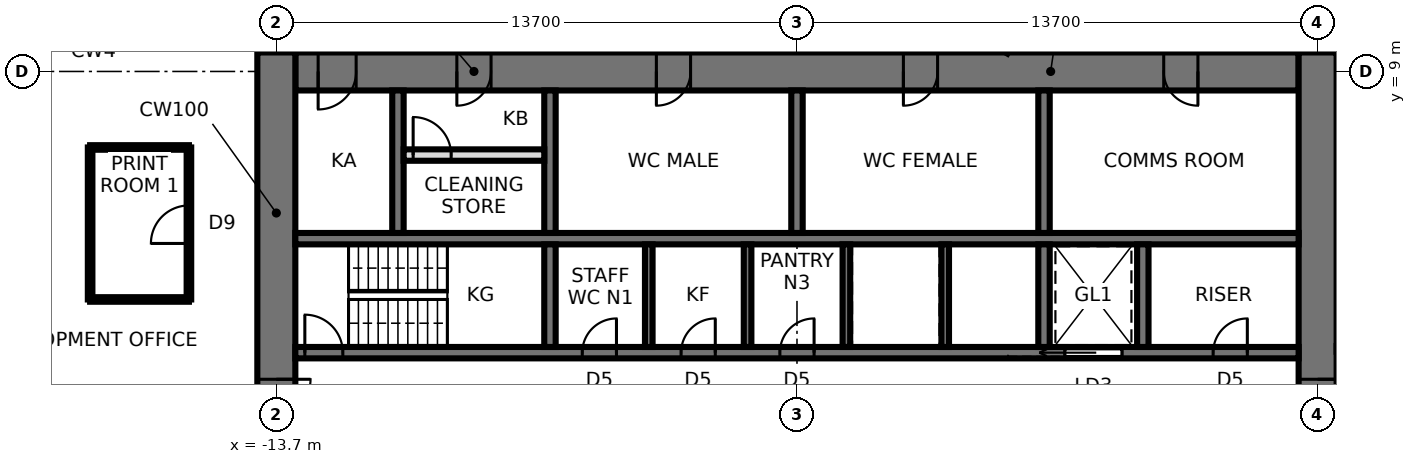
"""IFC4 building model, lengths in metres.
Left out: names, types, materials, properties, quantities, classifications, styles, units other than length and angle.
Written with IfcOpenShell. Run it as: python <this file> out.ifc"""

import sys

from ifc_helpers import new_model, si_unit, direction, frame, frame_2d, origin, place, context, subcontext, project, spatial, rectangle, extrude, element, fill, save


model = new_model("IFC4")
c1 = context("Model", 3, precision=1e-05, world=origin(), true_north=direction((0.0, 1.0)))
c2 = subcontext(c1, "Body", "Model", "MODEL_VIEW")
j1 = project(units=[si_unit("LENGTHUNIT", "METRE"), si_unit("PLANEANGLEUNIT", "RADIAN")], contexts=[c1])
p1 = place(None, origin())
s1 = spatial("IfcSite", under=j1, at=p1, CompositionType="ELEMENT")
p2 = place(p1, origin())
s2 = spatial("IfcBuilding", under=s1, at=p2, CompositionType="ELEMENT")
p3 = place(p2, frame((0.0, 0.0, 135.3)))
s3 = spatial("IfcBuildingStorey", under=s2, at=p3, CompositionType="ELEMENT", Elevation=135.3)
p4 = place(p3, frame((13.2, 9.0, 0.0), z_axis=(0.0, 0.0, 1.0), x_axis=(-1.0, 0.0, 0.0)))
e1 = element("IfcWall", 1, at=p4, inside=s3, PredefinedType="SHEAR", context=c2, shape_type="SweptSolid", body=[
    extrude(rectangle(XDim=26.4, YDim=1.0, at=frame_2d((13.2, 0.0))), origin(), (0.0, 0.0, 1.0), 3.9),
])
p5 = place(p4, frame((2.65, 0.0, 0.0)))
e2 = element("IfcOpeningElement", 2, at=p5, cuts=e1, PredefinedType="OPENING", context=c2, shape_type="SweptSolid", body=[
    extrude(rectangle(XDim=0.9, YDim=2.1, at=frame_2d((0.45, 1.05))), frame((0.0, 0.51, 0.0), z_axis=(0.0, -1.0, 0.0), x_axis=(1.0, 0.0, 0.0)), (0.0, 0.0, 1.0), 1.02),
])
p6 = place(p4, frame((9.5, 0.0, 0.0)))
e3 = element("IfcOpeningElement", 3, at=p6, cuts=e1, PredefinedType="OPENING", context=c2, shape_type="SweptSolid", body=[
    extrude(rectangle(XDim=0.9, YDim=2.1, at=frame_2d((0.45, 1.05))), frame((0.0, 0.51, 0.0), z_axis=(0.0, -1.0, 0.0), x_axis=(1.0, 0.0, 0.0)), (0.0, 0.0, 1.0), 1.02),
])
p7 = place(p4, frame((16.0, 0.0, 0.0)))
e4 = element("IfcOpeningElement", 4, at=p7, cuts=e1, PredefinedType="OPENING", context=c2, shape_type="SweptSolid", body=[
    extrude(rectangle(XDim=0.9, YDim=2.1, at=frame_2d((0.45, 1.05))), frame((0.0, 0.51, 0.0), z_axis=(0.0, -1.0, 0.0), x_axis=(1.0, 0.0, 0.0)), (0.0, 0.0, 1.0), 1.02),
])
p8 = place(p4, frame((21.25, 0.0, 0.0)))
e5 = element("IfcOpeningElement", 5, at=p8, cuts=e1, PredefinedType="OPENING", context=c2, shape_type="SweptSolid", body=[
    extrude(rectangle(XDim=0.9, YDim=2.1, at=frame_2d((0.45, 1.05))), frame((0.0, 0.51, 0.0), z_axis=(0.0, -1.0, 0.0), x_axis=(1.0, 0.0, 0.0)), (0.0, 0.0, 1.0), 1.02),
])
p9 = place(p4, frame((24.8, 0.0, 0.0)))
e6 = element("IfcOpeningElement", 6, at=p9, cuts=e1, PredefinedType="OPENING", context=c2, shape_type="SweptSolid", body=[
    extrude(rectangle(XDim=1.0, YDim=2.1, at=frame_2d((0.5, 1.05))), frame((0.0, 0.51, 0.0), z_axis=(0.0, -1.0, 0.0), x_axis=(1.0, 0.0, 0.0)), (0.0, 0.0, 1.0), 1.02),
])
p10 = place(p3, frame((13.7, -9.5, 0.0), z_axis=(0.0, 0.0, 1.0), x_axis=(0.0, 1.0, 0.0)))
e7 = element("IfcWall", 7, at=p10, inside=s3, PredefinedType="SHEAR", context=c2, shape_type="SweptSolid", body=[
    extrude(rectangle(XDim=19.0, YDim=1.0, at=frame_2d((9.5, 0.0))), origin(), (0.0, 0.0, 1.0), 3.9),
])
p11 = place(p10, frame((8.6, 0.0, 0.0)))
e8 = element("IfcOpeningElement", 8, at=p11, cuts=e7, PredefinedType="OPENING", context=c2, shape_type="SweptSolid", body=[
    extrude(rectangle(XDim=1.8, YDim=2.4, at=frame_2d((0.9, 1.2))), frame((0.0, 0.51, 0.0), z_axis=(0.0, -1.0, 0.0), x_axis=(1.0, 0.0, 0.0)), (0.0, 0.0, 1.0), 1.02),
])
p12 = place(p3, frame((-13.7, 9.5, 0.0), z_axis=(0.0, 0.0, 1.0), x_axis=(0.0, -1.0, 0.0)))
e9 = element("IfcWall", 9, at=p12, inside=s3, PredefinedType="SHEAR", context=c2, shape_type="SweptSolid", body=[
    extrude(rectangle(XDim=19.0, YDim=1.0, at=frame_2d((9.5, 0.0))), origin(), (0.0, 0.0, 1.0), 3.9),
])
p13 = place(p12, frame((8.6, 0.0, 0.0)))
e10 = element("IfcOpeningElement", 10, at=p13, cuts=e9, PredefinedType="OPENING", context=c2, shape_type="SweptSolid", body=[
    extrude(rectangle(XDim=1.8, YDim=2.4, at=frame_2d((0.9, 1.2))), frame((0.0, 0.51, 0.0), z_axis=(0.0, -1.0, 0.0), x_axis=(1.0, 0.0, 0.0)), (0.0, 0.0, 1.0), 1.02),
])
p14 = place(p3, frame((-13.2, 1.6, 0.0), z_axis=(0.0, 0.0, 1.0), x_axis=(1.0, 0.0, 0.0)))
e11 = element("IfcWall", 11, at=p14, inside=s3, PredefinedType="SHEAR", context=c2, shape_type="SweptSolid", body=[
    extrude(rectangle(XDim=26.4, YDim=0.3, at=frame_2d((13.2, 0.0))), origin(), (0.0, 0.0, 1.0), 3.9),
])
p15 = place(p14, frame((0.25, 0.0, 0.0)))
e12 = element("IfcOpeningElement", 12, at=p15, cuts=e11, PredefinedType="OPENING", context=c2, shape_type="SweptSolid", body=[
    extrude(rectangle(XDim=1.0, YDim=2.1, at=frame_2d((0.5, 1.05))), frame((0.0, 0.16, 0.0), z_axis=(0.0, -1.0, 0.0), x_axis=(1.0, 0.0, 0.0)), (0.0, 0.0, 1.0), 0.32),
])
p16 = place(p14, frame((20.25, 0.0, 0.0)))
e13 = element("IfcOpeningElement", 13, at=p16, cuts=e11, PredefinedType="OPENING", context=c2, shape_type="SweptSolid", body=[
    extrude(rectangle(XDim=1.5, YDim=2.4, at=frame_2d((0.75, 1.2))), frame((0.0, 0.16, 0.0), z_axis=(0.0, -1.0, 0.0), x_axis=(1.0, 0.0, 0.0)), (0.0, 0.0, 1.0), 0.32),
])
p17 = place(p14, frame((7.55, 0.0, 0.0)))
e14 = element("IfcOpeningElement", 14, at=p17, cuts=e11, PredefinedType="OPENING", context=c2, shape_type="SweptSolid", body=[
    extrude(rectangle(XDim=0.9, YDim=2.1, at=frame_2d((0.45, 1.05))), frame((0.0, 0.16, 0.0), z_axis=(0.0, -1.0, 0.0), x_axis=(1.0, 0.0, 0.0)), (0.0, 0.0, 1.0), 0.32),
])
p18 = place(p14, frame((10.15, 0.0, 0.0)))
e15 = element("IfcOpeningElement", 15, at=p18, cuts=e11, PredefinedType="OPENING", context=c2, shape_type="SweptSolid", body=[
    extrude(rectangle(XDim=0.9, YDim=2.1, at=frame_2d((0.45, 1.05))), frame((0.0, 0.16, 0.0), z_axis=(0.0, -1.0, 0.0), x_axis=(1.0, 0.0, 0.0)), (0.0, 0.0, 1.0), 0.32),
])
p19 = place(p14, frame((12.75, 0.0, 0.0)))
e16 = element("IfcOpeningElement", 16, at=p19, cuts=e11, PredefinedType="OPENING", context=c2, shape_type="SweptSolid", body=[
    extrude(rectangle(XDim=0.9, YDim=2.1, at=frame_2d((0.45, 1.05))), frame((0.0, 0.16, 0.0), z_axis=(0.0, -1.0, 0.0), x_axis=(1.0, 0.0, 0.0)), (0.0, 0.0, 1.0), 0.32),
])
p20 = place(p14, frame((24.15, 0.0, 0.0)))
e17 = element("IfcOpeningElement", 17, at=p20, cuts=e11, PredefinedType="OPENING", context=c2, shape_type="SweptSolid", body=[
    extrude(rectangle(XDim=0.9, YDim=2.1, at=frame_2d((0.45, 1.05))), frame((0.0, 0.16, 0.0), z_axis=(0.0, -1.0, 0.0), x_axis=(1.0, 0.0, 0.0)), (0.0, 0.0, 1.0), 0.32),
])
p21 = place(p3, frame((-13.2, 4.6, 0.0), z_axis=(0.0, 0.0, 1.0), x_axis=(1.0, 0.0, 0.0)))
e18 = element("IfcWall", 18, at=p21, inside=s3, PredefinedType="SHEAR", context=c2, shape_type="SweptSolid", body=[
    extrude(rectangle(XDim=26.4, YDim=0.3, at=frame_2d((13.2, 0.0))), origin(), (0.0, 0.0, 1.0), 3.9),
])
p22 = place(p3, frame((-6.5, 1.75, 0.0), z_axis=(0.0, 0.0, 1.0), x_axis=(0.0, 1.0, 0.0)))
e19 = element("IfcWall", 19, at=p22, inside=s3, PredefinedType="SHEAR", context=c2, shape_type="SweptSolid", body=[
    extrude(rectangle(XDim=2.7, YDim=0.3, at=frame_2d((1.35, 0.0))), origin(), (0.0, 0.0, 1.0), 3.9),
])
p23 = place(p3, frame((-6.5, 4.75, 0.0), z_axis=(0.0, 0.0, 1.0), x_axis=(0.0, 1.0, 0.0)))
e20 = element("IfcWall", 20, at=p23, inside=s3, PredefinedType="SHEAR", context=c2, shape_type="SweptSolid", body=[
    extrude(rectangle(XDim=3.75, YDim=0.3, at=frame_2d((1.875, 0.0))), origin(), (0.0, 0.0, 1.0), 3.9),
])
p24 = place(p3, frame((6.5, 1.75, 0.0), z_axis=(0.0, 0.0, 1.0), x_axis=(0.0, 1.0, 0.0)))
e21 = element("IfcWall", 21, at=p24, inside=s3, PredefinedType="SHEAR", context=c2, shape_type="SweptSolid", body=[
    extrude(rectangle(XDim=2.7, YDim=0.3, at=frame_2d((1.35, 0.0))), origin(), (0.0, 0.0, 1.0), 3.9),
])
p25 = place(p3, frame((6.5, 4.75, 0.0), z_axis=(0.0, 0.0, 1.0), x_axis=(0.0, 1.0, 0.0)))
e22 = element("IfcWall", 22, at=p25, inside=s3, PredefinedType="SHEAR", context=c2, shape_type="SweptSolid", body=[
    extrude(rectangle(XDim=3.75, YDim=0.3, at=frame_2d((1.875, 0.0))), origin(), (0.0, 0.0, 1.0), 3.9),
])
for number, where, z_axis, x_axis in (
    (23, (-3.9, 1.75, 0.0), (0.0, 0.0, 1.0), (0.0, 1.0, 0.0)),
    (24, (-1.3, 1.75, 0.0), (0.0, 0.0, 1.0), (0.0, 1.0, 0.0)),
    (25, (1.3, 1.75, 0.0), (0.0, 0.0, 1.0), (0.0, 1.0, 0.0)),
    (26, (3.9, 1.75, 0.0), (0.0, 0.0, 1.0), (0.0, 1.0, 0.0)),
):
    element("IfcWall", number, at=place(p3, frame(where, z_axis=z_axis, x_axis=x_axis)), inside=s3, PredefinedType="SHEAR", context=c2, shape_type="SweptSolid", body=[
        extrude(rectangle(XDim=2.7, YDim=0.2, at=frame_2d((1.35, 0.0))), origin(), (0.0, 0.0, 1.0), 3.9),
    ])
for number, where, z_axis, x_axis in (
    (27, (0.0, 4.75, 0.0), (0.0, 0.0, 1.0), (0.0, 1.0, 0.0)),
    (28, (-10.5, 4.75, 0.0), (0.0, 0.0, 1.0), (0.0, 1.0, 0.0)),
):
    element("IfcWall", number, at=place(p3, frame(where, z_axis=z_axis, x_axis=x_axis)), inside=s3, PredefinedType="SHEAR", context=c2, shape_type="SweptSolid", body=[
        extrude(rectangle(XDim=3.75, YDim=0.3, at=frame_2d((1.875, 0.0))), origin(), (0.0, 0.0, 1.0), 3.9),
    ])
p26 = place(p3, frame((9.1, 1.75, 0.0), z_axis=(0.0, 0.0, 1.0), x_axis=(0.0, 1.0, 0.0)))
e29 = element("IfcWall", 29, at=p26, inside=s3, PredefinedType="SHEAR", context=c2, shape_type="SweptSolid", body=[
    extrude(rectangle(XDim=2.7, YDim=0.3, at=frame_2d((1.35, 0.0))), origin(), (0.0, 0.0, 1.0), 3.9),
])
p27 = place(p3, frame((-10.35, 6.8, 0.0), z_axis=(0.0, 0.0, 1.0), x_axis=(1.0, 0.0, 0.0)))
e30 = element("IfcWall", 30, at=p27, inside=s3, PredefinedType="PARTITIONING", context=c2, shape_type="SweptSolid", body=[
    extrude(rectangle(XDim=3.7, YDim=0.3, at=frame_2d((1.85, 0.0))), origin(), (0.0, 0.0, 1.0), 3.74),
])
p28 = place(p27, frame((0.25, 0.0, 0.0)))
e31 = element("IfcOpeningElement", 31, at=p28, cuts=e30, PredefinedType="OPENING", context=c2, shape_type="SweptSolid", body=[
    extrude(rectangle(XDim=1.0, YDim=2.4, at=frame_2d((0.5, 1.2))), frame((0.0, 0.16, 0.0), z_axis=(0.0, -1.0, 0.0), x_axis=(1.0, 0.0, 0.0)), (0.0, 0.0, 1.0), 0.32),
])
p29 = place(p3, frame((6.524, 11.3, 0.0), z_axis=(0.0, 0.0, 1.0), x_axis=(-0.499929208183, -0.866066271601, 0.0)))
e32 = element("IfcWall", 32, at=p29, inside=s3, PredefinedType="PARTITIONING", context=c2, shape_type="SweptSolid", body=[
    extrude(rectangle(XDim=2.078, YDim=0.12, at=frame_2d((1.039, 0.0))), origin(), (0.0, 0.0, 1.0), 3.74),
])
p30 = place(p3, frame((-18.6, 7.0, 0.0), z_axis=(0.0, 0.0, 1.0), x_axis=(1.0, 0.0, 0.0)))
e33 = element("IfcWall", 33, at=p30, inside=s3, PredefinedType="PARTITIONING", context=c2, shape_type="SweptSolid", body=[
    extrude(rectangle(XDim=2.6, YDim=0.12, at=frame_2d((1.3, 0.0))), origin(), (0.0, 0.0, 1.0), 3.74),
])
p31 = place(p3, frame((-16.0, 7.0, 0.0), z_axis=(0.0, 0.0, 1.0), x_axis=(0.0, -1.0, 0.0)))
e34 = element("IfcWall", 34, at=p31, inside=s3, PredefinedType="PARTITIONING", context=c2, shape_type="SweptSolid", body=[
    extrude(rectangle(XDim=4.0, YDim=0.12, at=frame_2d((2.0, 0.0))), origin(), (0.0, 0.0, 1.0), 3.74),
])
p32 = place(p31, frame((1.526, 0.0, 0.0)))
e35 = element("IfcOpeningElement", 35, at=p32, cuts=e34, PredefinedType="OPENING", context=c2, shape_type="SweptSolid", body=[
    extrude(rectangle(XDim=1.0, YDim=2.4, at=frame_2d((0.5, 1.2))), frame((0.0, 0.07, 0.0), z_axis=(0.0, -1.0, 0.0), x_axis=(1.0, 0.0, 0.0)), (0.0, 0.0, 1.0), 0.14),
])
p33 = place(p3, frame((-18.6, 3.0, 0.0), z_axis=(0.0, 0.0, 1.0), x_axis=(0.0, 1.0, 0.0)))
e36 = element("IfcWall", 36, at=p33, inside=s3, PredefinedType="PARTITIONING", context=c2, shape_type="SweptSolid", body=[
    extrude(rectangle(XDim=4.0, YDim=0.12, at=frame_2d((2.0, 0.0))), origin(), (0.0, 0.0, 1.0), 3.286),
])
p34 = place(p3, frame((-16.0, 3.0, 0.0), z_axis=(0.0, 0.0, 1.0), x_axis=(-1.0, 0.0, 0.0)))
e37 = element("IfcWall", 37, at=p34, inside=s3, PredefinedType="PARTITIONING", context=c2, shape_type="SweptSolid", body=[
    extrude(rectangle(XDim=2.6, YDim=0.12, at=frame_2d((1.3, 0.0))), origin(), (0.0, 0.0, 1.0), 3.74),
])
p35 = place(p13, origin())
e38 = element("IfcDoor", 38, at=p35, inside=s3, OperationType="DOUBLE_DOOR_SINGLE_SWING", PredefinedType="DOOR", context=c2, shape_type="SweptSolid", body=[
    extrude(rectangle(XDim=1.72, YDim=2.36, at=frame_2d((0.9, 1.18))), frame((0.0, 0.025, 0.0), z_axis=(0.0, -1.0, 0.0), x_axis=(1.0, 0.0, 0.0)), (0.0, 0.0, 1.0), 0.05),
    extrude(rectangle(XDim=0.04, YDim=2.4, at=frame_2d((0.02, 1.2))), frame((0.0, 0.25, 0.0), z_axis=(0.0, -1.0, 0.0), x_axis=(1.0, 0.0, 0.0)), (0.0, 0.0, 1.0), 0.5),
    extrude(rectangle(XDim=0.04, YDim=2.4, at=frame_2d((1.78, 1.2))), frame((0.0, 0.25, 0.0), z_axis=(0.0, -1.0, 0.0), x_axis=(1.0, 0.0, 0.0)), (0.0, 0.0, 1.0), 0.5),
    extrude(rectangle(XDim=1.72, YDim=0.04, at=frame_2d((0.9, 2.38))), frame((0.0, 0.25, 0.0), z_axis=(0.0, -1.0, 0.0), x_axis=(1.0, 0.0, 0.0)), (0.0, 0.0, 1.0), 0.5),
])
fill(e10, e38)
p36 = place(p11, frame((1.8, 0.0, 0.0), z_axis=(0.0, 0.0, 1.0), x_axis=(-1.0, 0.0, 0.0)))
e39 = element("IfcDoor", 39, at=p36, inside=s3, OperationType="DOUBLE_DOOR_SINGLE_SWING", PredefinedType="DOOR", context=c2, shape_type="SweptSolid", body=[
    extrude(rectangle(XDim=1.72, YDim=2.36, at=frame_2d((0.9, 1.18))), frame((0.0, 0.025, 0.0), z_axis=(0.0, -1.0, 0.0), x_axis=(1.0, 0.0, 0.0)), (0.0, 0.0, 1.0), 0.05),
    extrude(rectangle(XDim=0.04, YDim=2.4, at=frame_2d((1.78, 1.2))), frame((0.0, 0.25, 0.0), z_axis=(0.0, -1.0, 0.0), x_axis=(1.0, 0.0, 0.0)), (0.0, 0.0, 1.0), 0.5),
    extrude(rectangle(XDim=0.04, YDim=2.4, at=frame_2d((0.02, 1.2))), frame((0.0, 0.25, 0.0), z_axis=(0.0, -1.0, 0.0), x_axis=(1.0, 0.0, 0.0)), (0.0, 0.0, 1.0), 0.5),
    extrude(rectangle(XDim=1.72, YDim=0.04, at=frame_2d((0.9, 2.38))), frame((0.0, 0.25, 0.0), z_axis=(0.0, -1.0, 0.0), x_axis=(1.0, 0.0, 0.0)), (0.0, 0.0, 1.0), 0.5),
])
fill(e8, e39)
p37 = place(p15, origin())
e40 = element("IfcDoor", 40, at=p37, inside=s3, OperationType="SINGLE_SWING_LEFT", PredefinedType="DOOR", context=c2, shape_type="SweptSolid", body=[
    extrude(rectangle(XDim=1.0, YDim=2.1, at=frame_2d((0.5, 1.05))), frame((0.0, 0.025, 0.0), z_axis=(0.0, -1.0, 0.0), x_axis=(1.0, 0.0, 0.0)), (0.0, 0.0, 1.0), 0.05),
])
fill(e12, e40)
p38 = place(p16, origin())
e41 = element("IfcDoor", 41, at=p38, inside=s3, OperationType="SLIDING_TO_LEFT", PredefinedType="DOOR", context=c2, shape_type="SweptSolid", body=[
    extrude(rectangle(XDim=1.5, YDim=2.4, at=frame_2d((0.75, 1.2))), frame((0.0, 0.025, 0.0), z_axis=(0.0, -1.0, 0.0), x_axis=(1.0, 0.0, 0.0)), (0.0, 0.0, 1.0), 0.05),
])
fill(e13, e41)
p39 = place(p17, origin())
e42 = element("IfcDoor", 42, at=p39, inside=s3, OperationType="SINGLE_SWING_RIGHT", PredefinedType="DOOR", context=c2, shape_type="SweptSolid", body=[
    extrude(rectangle(XDim=0.9, YDim=2.1, at=frame_2d((0.45, 1.05))), frame((0.0, 0.025, 0.0), z_axis=(0.0, -1.0, 0.0), x_axis=(1.0, 0.0, 0.0)), (0.0, 0.0, 1.0), 0.05),
])
fill(e14, e42)
p40 = place(p18, origin())
e43 = element("IfcDoor", 43, at=p40, inside=s3, OperationType="SINGLE_SWING_RIGHT", PredefinedType="DOOR", context=c2, shape_type="SweptSolid", body=[
    extrude(rectangle(XDim=0.9, YDim=2.1, at=frame_2d((0.45, 1.05))), frame((0.0, 0.025, 0.0), z_axis=(0.0, -1.0, 0.0), x_axis=(1.0, 0.0, 0.0)), (0.0, 0.0, 1.0), 0.05),
])
fill(e15, e43)
p41 = place(p19, origin())
e44 = element("IfcDoor", 44, at=p41, inside=s3, OperationType="SINGLE_SWING_RIGHT", PredefinedType="DOOR", context=c2, shape_type="SweptSolid", body=[
    extrude(rectangle(XDim=0.9, YDim=2.1, at=frame_2d((0.45, 1.05))), frame((0.0, 0.025, 0.0), z_axis=(0.0, -1.0, 0.0), x_axis=(1.0, 0.0, 0.0)), (0.0, 0.0, 1.0), 0.05),
])
fill(e16, e44)
p42 = place(p20, origin())
e45 = element("IfcDoor", 45, at=p42, inside=s3, OperationType="SINGLE_SWING_RIGHT", PredefinedType="DOOR", context=c2, shape_type="SweptSolid", body=[
    extrude(rectangle(XDim=0.9, YDim=2.1, at=frame_2d((0.45, 1.05))), frame((0.0, 0.025, 0.0), z_axis=(0.0, -1.0, 0.0), x_axis=(1.0, 0.0, 0.0)), (0.0, 0.0, 1.0), 0.05),
])
fill(e17, e45)
p43 = place(p5, origin())
e46 = element("IfcDoor", 46, at=p43, inside=s3, OperationType="SINGLE_SWING_LEFT", PredefinedType="DOOR", context=c2, shape_type="SweptSolid", body=[
    extrude(rectangle(XDim=0.82, YDim=2.06, at=frame_2d((0.45, 1.03))), frame((0.0, 0.025, 0.0), z_axis=(0.0, -1.0, 0.0), x_axis=(1.0, 0.0, 0.0)), (0.0, 0.0, 1.0), 0.05),
    extrude(rectangle(XDim=0.04, YDim=2.1, at=frame_2d((0.02, 1.05))), frame((0.0, 0.25, 0.0), z_axis=(0.0, -1.0, 0.0), x_axis=(1.0, 0.0, 0.0)), (0.0, 0.0, 1.0), 0.5),
    extrude(rectangle(XDim=0.04, YDim=2.1, at=frame_2d((0.88, 1.05))), frame((0.0, 0.25, 0.0), z_axis=(0.0, -1.0, 0.0), x_axis=(1.0, 0.0, 0.0)), (0.0, 0.0, 1.0), 0.5),
    extrude(rectangle(XDim=0.82, YDim=0.04, at=frame_2d((0.45, 2.08))), frame((0.0, 0.25, 0.0), z_axis=(0.0, -1.0, 0.0), x_axis=(1.0, 0.0, 0.0)), (0.0, 0.0, 1.0), 0.5),
])
fill(e2, e46)
p44 = place(p6, origin())
e47 = element("IfcDoor", 47, at=p44, inside=s3, OperationType="SINGLE_SWING_RIGHT", PredefinedType="DOOR", context=c2, shape_type="SweptSolid", body=[
    extrude(rectangle(XDim=0.82, YDim=2.06, at=frame_2d((0.45, 1.03))), frame((0.0, 0.025, 0.0), z_axis=(0.0, -1.0, 0.0), x_axis=(1.0, 0.0, 0.0)), (0.0, 0.0, 1.0), 0.05),
    extrude(rectangle(XDim=0.04, YDim=2.1, at=frame_2d((0.02, 1.05))), frame((0.0, 0.25, 0.0), z_axis=(0.0, -1.0, 0.0), x_axis=(1.0, 0.0, 0.0)), (0.0, 0.0, 1.0), 0.5),
    extrude(rectangle(XDim=0.04, YDim=2.1, at=frame_2d((0.88, 1.05))), frame((0.0, 0.25, 0.0), z_axis=(0.0, -1.0, 0.0), x_axis=(1.0, 0.0, 0.0)), (0.0, 0.0, 1.0), 0.5),
    extrude(rectangle(XDim=0.82, YDim=0.04, at=frame_2d((0.45, 2.08))), frame((0.0, 0.25, 0.0), z_axis=(0.0, -1.0, 0.0), x_axis=(1.0, 0.0, 0.0)), (0.0, 0.0, 1.0), 0.5),
])
fill(e3, e47)
p45 = place(p7, origin())
e48 = element("IfcDoor", 48, at=p45, inside=s3, OperationType="SINGLE_SWING_RIGHT", PredefinedType="DOOR", context=c2, shape_type="SweptSolid", body=[
    extrude(rectangle(XDim=0.82, YDim=2.06, at=frame_2d((0.45, 1.03))), frame((0.0, 0.025, 0.0), z_axis=(0.0, -1.0, 0.0), x_axis=(1.0, 0.0, 0.0)), (0.0, 0.0, 1.0), 0.05),
    extrude(rectangle(XDim=0.04, YDim=2.1, at=frame_2d((0.02, 1.05))), frame((0.0, 0.25, 0.0), z_axis=(0.0, -1.0, 0.0), x_axis=(1.0, 0.0, 0.0)), (0.0, 0.0, 1.0), 0.5),
    extrude(rectangle(XDim=0.04, YDim=2.1, at=frame_2d((0.88, 1.05))), frame((0.0, 0.25, 0.0), z_axis=(0.0, -1.0, 0.0), x_axis=(1.0, 0.0, 0.0)), (0.0, 0.0, 1.0), 0.5),
    extrude(rectangle(XDim=0.82, YDim=0.04, at=frame_2d((0.45, 2.08))), frame((0.0, 0.25, 0.0), z_axis=(0.0, -1.0, 0.0), x_axis=(1.0, 0.0, 0.0)), (0.0, 0.0, 1.0), 0.5),
])
fill(e4, e48)
p46 = place(p8, origin())
e49 = element("IfcDoor", 49, at=p46, inside=s3, OperationType="SINGLE_SWING_RIGHT", PredefinedType="DOOR", context=c2, shape_type="SweptSolid", body=[
    extrude(rectangle(XDim=0.82, YDim=2.06, at=frame_2d((0.45, 1.03))), frame((0.0, 0.025, 0.0), z_axis=(0.0, -1.0, 0.0), x_axis=(1.0, 0.0, 0.0)), (0.0, 0.0, 1.0), 0.05),
    extrude(rectangle(XDim=0.04, YDim=2.1, at=frame_2d((0.02, 1.05))), frame((0.0, 0.25, 0.0), z_axis=(0.0, -1.0, 0.0), x_axis=(1.0, 0.0, 0.0)), (0.0, 0.0, 1.0), 0.5),
    extrude(rectangle(XDim=0.04, YDim=2.1, at=frame_2d((0.88, 1.05))), frame((0.0, 0.25, 0.0), z_axis=(0.0, -1.0, 0.0), x_axis=(1.0, 0.0, 0.0)), (0.0, 0.0, 1.0), 0.5),
    extrude(rectangle(XDim=0.82, YDim=0.04, at=frame_2d((0.45, 2.08))), frame((0.0, 0.25, 0.0), z_axis=(0.0, -1.0, 0.0), x_axis=(1.0, 0.0, 0.0)), (0.0, 0.0, 1.0), 0.5),
])
fill(e5, e49)
p47 = place(p9, origin())
e50 = element("IfcDoor", 50, at=p47, inside=s3, OperationType="SINGLE_SWING_RIGHT", PredefinedType="DOOR", context=c2, shape_type="SweptSolid", body=[
    extrude(rectangle(XDim=0.92, YDim=2.06, at=frame_2d((0.5, 1.03))), frame((0.0, 0.025, 0.0), z_axis=(0.0, -1.0, 0.0), x_axis=(1.0, 0.0, 0.0)), (0.0, 0.0, 1.0), 0.05),
    extrude(rectangle(XDim=0.04, YDim=2.1, at=frame_2d((0.02, 1.05))), frame((0.0, 0.25, 0.0), z_axis=(0.0, -1.0, 0.0), x_axis=(1.0, 0.0, 0.0)), (0.0, 0.0, 1.0), 0.5),
    extrude(rectangle(XDim=0.04, YDim=2.1, at=frame_2d((0.98, 1.05))), frame((0.0, 0.25, 0.0), z_axis=(0.0, -1.0, 0.0), x_axis=(1.0, 0.0, 0.0)), (0.0, 0.0, 1.0), 0.5),
    extrude(rectangle(XDim=0.92, YDim=0.04, at=frame_2d((0.5, 2.08))), frame((0.0, 0.25, 0.0), z_axis=(0.0, -1.0, 0.0), x_axis=(1.0, 0.0, 0.0)), (0.0, 0.0, 1.0), 0.5),
])
fill(e6, e50)
p48 = place(p28, origin())
e51 = element("IfcDoor", 51, at=p48, inside=s3, OperationType="SINGLE_SWING_LEFT", PredefinedType="DOOR", context=c2, shape_type="SweptSolid", body=[
    extrude(rectangle(XDim=1.0, YDim=2.4, at=frame_2d((0.5, 1.2))), frame((0.0, 0.025, 0.0), z_axis=(0.0, -1.0, 0.0), x_axis=(1.0, 0.0, 0.0)), (0.0, 0.0, 1.0), 0.05),
])
fill(e31, e51)
p49 = place(p32, frame((1.0, 0.0, 0.0), z_axis=(0.0, 0.0, 1.0), x_axis=(-1.0, 0.0, 0.0)))
e52 = element("IfcDoor", 52, at=p49, inside=s3, OperationType="SINGLE_SWING_LEFT", PredefinedType="DOOR", context=c2, shape_type="SweptSolid", body=[
    extrude(rectangle(XDim=1.0, YDim=2.4, at=frame_2d((0.5, 1.2))), frame((0.0, 0.025, 0.0), z_axis=(0.0, -1.0, 0.0), x_axis=(1.0, 0.0, 0.0)), (0.0, 0.0, 1.0), 0.05),
])
fill(e35, e52)
save(model, sys.argv[1])
